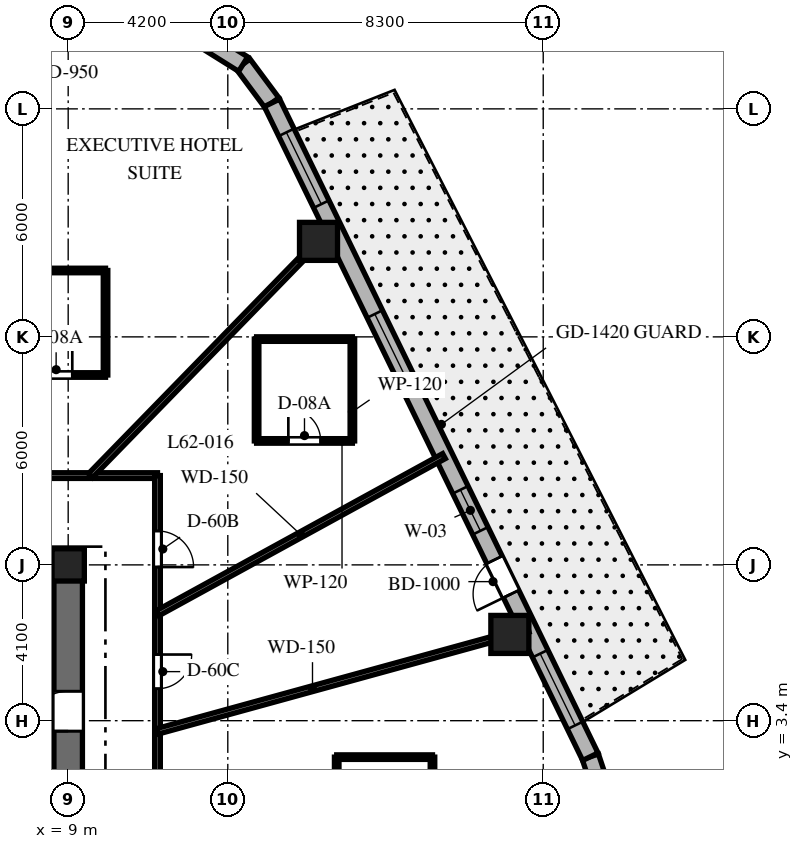
"""IFC4 building model, lengths in metres.
Left out: names, types, materials, properties, quantities, classifications, styles, units other than length and angle.
Written with IfcOpenShell. Run it as: python <this file> out.ifc"""

import sys

from ifc_helpers import new_model, si_unit, direction, frame, frame_2d, origin, origin_2d, place, context, subcontext, project, spatial, rectangle, extrude, element, fill, save


model = new_model("IFC4")
c1 = context("Model", 3, precision=1e-05, world=origin(), true_north=direction((0.0, 1.0)))
c2 = subcontext(c1, "Body", "Model", "MODEL_VIEW")
j1 = project(units=[si_unit("LENGTHUNIT", "METRE"), si_unit("PLANEANGLEUNIT", "RADIAN")], contexts=[c1])
p1 = place(None, origin())
s1 = spatial("IfcSite", under=j1, at=p1, CompositionType="ELEMENT")
p2 = place(p1, origin())
s2 = spatial("IfcBuilding", under=s1, at=p2, CompositionType="ELEMENT")
p3 = place(p2, frame((0.0, 0.0, 248.3)))
s3 = spatial("IfcBuildingStorey", under=s2, at=p3, CompositionType="ELEMENT", Elevation=248.3)
p4 = place(p3, frame((1.85, 7.5, 0.0), z_axis=(0.0, 0.0, 1.0), x_axis=(1.0, 0.0, 0.0)))
e1 = element("IfcWall", 1, at=p4, inside=s3, PredefinedType="SHEAR", context=c2, shape_type="SweptSolid", body=[
    extrude(rectangle(XDim=7.525, YDim=0.75, at=frame_2d((3.762, 0.0))), origin(), (0.0, 0.0, 1.0), 3.8),
])
p5 = place(p3, frame((9.0, -7.125, 0.0), z_axis=(0.0, 0.0, 1.0), x_axis=(0.0, 1.0, 0.0)))
e2 = element("IfcWall", 2, at=p5, inside=s3, PredefinedType="SHEAR", context=c2, shape_type="SweptSolid", body=[
    extrude(rectangle(XDim=14.25, YDim=0.75, at=frame_2d((7.125, 0.0))), origin(), (0.0, 0.0, 1.0), 3.8),
])
p6 = place(p5, frame((10.25, 0.0, 0.0)))
e3 = element("IfcOpeningElement", 3, at=p6, cuts=e2, PredefinedType="OPENING", context=c2, shape_type="SweptSolid", body=[
    extrude(rectangle(XDim=1.05, YDim=2.15, at=frame_2d((0.525, 1.075))), frame((0.0, 0.385, 0.0), z_axis=(0.0, -1.0, 0.0), x_axis=(1.0, 0.0, 0.0)), (0.0, 0.0, 1.0), 0.77),
])
p7 = place(p3, frame((9.0, 7.5, 0.0), z_axis=(0.0, 0.0, 1.0), x_axis=(1.0, 0.0, 0.0)))
e4 = element("IfcColumn", 4, at=p7, inside=s3, PredefinedType="COLUMN", context=c2, shape_type="SweptSolid", body=[
    extrude(rectangle(XDim=0.85, YDim=0.85, at=origin_2d()), origin(), (0.0, 0.0, 1.0), 3.8),
])
for number, where, z_axis, x_axis in (
    (5, (20.622, 5.67, 0.0), (0.0, 0.0, 1.0), (1.0, 0.0, 0.0)),
    (6, (15.587, 16.013, 0.0), (0.0, 0.0, 1.0), (1.0, 0.0, 0.0)),
):
    element("IfcColumn", number, at=place(p3, frame(where, z_axis=z_axis, x_axis=x_axis)), inside=s3, PredefinedType="COLUMN", context=c2, shape_type="SweptSolid", body=[
        extrude(rectangle(XDim=1.0, YDim=1.0, at=origin_2d()), origin(), (0.0, 0.0, 1.0), 3.8),
    ])
p8 = place(p3, frame((23.023, 1.604, 0.0), z_axis=(0.0, 0.0, 1.0), x_axis=(-0.316801227695, 0.948491951537, 0.0)))
e7 = element("IfcWall", 7, at=p8, inside=s3, PredefinedType="SOLIDWALL", context=c2, shape_type="SweptSolid", body=[
    extrude(rectangle(XDim=0.894, YDim=0.45, at=frame_2d((0.447, 0.0))), origin(), (0.0, 0.0, 1.0), 3.5),
])
p9 = place(p3, frame((14.362, 19.658, 0.0), z_axis=(0.0, 0.0, 1.0), x_axis=(-0.596642462792, 0.80250717853, 0.0)))
e8 = element("IfcWall", 8, at=p9, inside=s3, PredefinedType="SOLIDWALL", context=c2, shape_type="SweptSolid", body=[
    extrude(rectangle(XDim=1.27, YDim=0.45, at=frame_2d((0.635, 0.0))), origin(), (0.0, 0.0, 1.0), 3.5),
])
p10 = place(p3, frame((13.604, 20.678, 0.0), z_axis=(0.0, 0.0, 1.0), x_axis=(-0.847910404124, 0.53013955387, 0.0)))
e9 = element("IfcWall", 9, at=p10, inside=s3, PredefinedType="SOLIDWALL", context=c2, shape_type="SweptSolid", body=[
    extrude(rectangle(XDim=1.249, YDim=0.45, at=frame_2d((0.624, 0.0))), origin(), (0.0, 0.0, 1.0), 3.5),
])
p11 = place(p3, frame((22.74, 2.452, 0.0), z_axis=(0.0, 0.0, 1.0), x_axis=(-0.437753424814, 0.899095066755, 0.0)))
e10 = element("IfcWall", 10, at=p11, inside=s3, PredefinedType="SOLIDWALL", context=c2, shape_type="SweptSolid", body=[
    extrude(rectangle(XDim=19.137, YDim=0.45, at=frame_2d((9.569, 0.0))), origin(), (0.0, 0.0, 1.0), 3.5),
])
p12 = place(p11, frame((4.763, 0.0, 0.0)))
e11 = element("IfcOpeningElement", 11, at=p12, cuts=e10, PredefinedType="OPENING", context=c2, shape_type="SweptSolid", body=[
    extrude(rectangle(XDim=1.0, YDim=2.15, at=frame_2d((0.5, 1.075))), frame((0.0, 0.235, 0.0), z_axis=(0.0, -1.0, 0.0), x_axis=(1.0, 0.0, 0.0)), (0.0, 0.0, 1.0), 0.47),
])
p13 = place(p11, frame((6.611, 0.0, 0.8)))
e12 = element("IfcOpeningElement", 12, at=p13, cuts=e10, PredefinedType="OPENING", context=c2, shape_type="SweptSolid", body=[
    extrude(rectangle(XDim=1.2, YDim=1.8, at=frame_2d((0.6, 0.9))), frame((0.0, 0.235, 0.0), z_axis=(0.0, -1.0, 0.0), x_axis=(1.0, 0.0, 0.0)), (0.0, 0.0, 1.0), 0.47),
])
p14 = place(p11, frame((10.856, 0.0, 0.8)))
e13 = element("IfcOpeningElement", 13, at=p14, cuts=e10, PredefinedType="OPENING", context=c2, shape_type="SweptSolid", body=[
    extrude(rectangle(XDim=2.1, YDim=1.85, at=frame_2d((1.05, 0.925))), frame((0.0, 0.235, 0.0), z_axis=(0.0, -1.0, 0.0), x_axis=(1.0, 0.0, 0.0)), (0.0, 0.0, 1.0), 0.47),
])
p15 = place(p11, frame((16.173, 0.0, 0.8)))
e14 = element("IfcOpeningElement", 14, at=p15, cuts=e10, PredefinedType="OPENING", context=c2, shape_type="SweptSolid", body=[
    extrude(rectangle(XDim=2.1, YDim=1.85, at=frame_2d((1.05, 0.925))), frame((0.0, 0.235, 0.0), z_axis=(0.0, -1.0, 0.0), x_axis=(1.0, 0.0, 0.0)), (0.0, 0.0, 1.0), 0.47),
])
p16 = place(p11, frame((0.916, 0.0, 0.8)))
e15 = element("IfcOpeningElement", 15, at=p16, cuts=e10, PredefinedType="OPENING", context=c2, shape_type="SweptSolid", body=[
    extrude(rectangle(XDim=2.1, YDim=1.85, at=frame_2d((1.05, 0.925))), frame((0.0, 0.235, 0.0), z_axis=(0.0, -1.0, 0.0), x_axis=(1.0, 0.0, 0.0)), (0.0, 0.0, 1.0), 0.47),
])
p17 = place(p3, frame((0.92, 9.85, 0.0), z_axis=(0.0, 0.0, 1.0), x_axis=(1.0, 0.0, 0.0)))
e16 = element("IfcWall", 16, at=p17, inside=s3, PredefinedType="PARTITIONING", context=c2, shape_type="SweptSolid", body=[
    extrude(rectangle(XDim=10.43, YDim=0.15, at=frame_2d((5.215, 0.0))), origin(), (0.0, 0.0, 1.0), 2.99),
])
p18 = place(p17, frame((4.949, 0.0, 0.0)))
e17 = element("IfcOpeningElement", 17, at=p18, cuts=e16, PredefinedType="OPENING", context=c2, shape_type="SweptSolid", body=[
    extrude(rectangle(XDim=0.95, YDim=2.03, at=frame_2d((0.475, 1.015))), frame((0.0, 0.085, 0.0), z_axis=(0.0, -1.0, 0.0), x_axis=(1.0, 0.0, 0.0)), (0.0, 0.0, 1.0), 0.17),
])
p19 = place(p3, frame((11.35, 9.85, 0.0), z_axis=(0.0, 0.0, 1.0), x_axis=(0.0, -1.0, 0.0)))
e18 = element("IfcWall", 18, at=p19, inside=s3, PredefinedType="PARTITIONING", context=c2, shape_type="SweptSolid", body=[
    extrude(rectangle(XDim=12.4, YDim=0.15, at=frame_2d((6.2, 0.0))), origin(), (0.0, 0.0, 1.0), 2.99),
])
p20 = place(p19, frame((4.709, 0.0, 0.0)))
e19 = element("IfcOpeningElement", 19, at=p20, cuts=e18, PredefinedType="OPENING", context=c2, shape_type="SweptSolid", body=[
    extrude(rectangle(XDim=0.9, YDim=2.03, at=frame_2d((0.45, 1.015))), frame((0.0, 0.085, 0.0), z_axis=(0.0, -1.0, 0.0), x_axis=(1.0, 0.0, 0.0)), (0.0, 0.0, 1.0), 0.17),
])
p21 = place(p19, frame((1.457, 0.0, 0.0)))
e20 = element("IfcOpeningElement", 20, at=p21, cuts=e18, PredefinedType="OPENING", context=c2, shape_type="SweptSolid", body=[
    extrude(rectangle(XDim=0.95, YDim=2.03, at=frame_2d((0.475, 1.015))), frame((0.0, 0.085, 0.0), z_axis=(0.0, -1.0, 0.0), x_axis=(1.0, 0.0, 0.0)), (0.0, 0.0, 1.0), 0.17),
])
p22 = place(p19, frame((8.835, 0.0, 0.0)))
e21 = element("IfcOpeningElement", 21, at=p22, cuts=e18, PredefinedType="OPENING", context=c2, shape_type="SweptSolid", body=[
    extrude(rectangle(XDim=0.95, YDim=2.03, at=frame_2d((0.475, 1.015))), frame((0.0, 0.085, 0.0), z_axis=(0.0, -1.0, 0.0), x_axis=(1.0, 0.0, 0.0)), (0.0, 0.0, 1.0), 0.17),
])
p23 = place(p3, frame((11.35, 3.121, 0.0), z_axis=(0.0, 0.0, 1.0), x_axis=(0.964212793822, 0.265129568758, 0.0)))
e22 = element("IfcWall", 22, at=p23, inside=s3, PredefinedType="PARTITIONING", context=c2, shape_type="SweptSolid", body=[
    extrude(rectangle(XDim=10.12, YDim=0.15, at=frame_2d((5.06, 0.0))), origin(), (0.0, 0.0, 1.0), 2.74),
])
p24 = place(p3, frame((11.35, 6.227, 0.0), z_axis=(0.0, 0.0, 1.0), x_axis=(0.876723190824, 0.480995266786, 0.0)))
e23 = element("IfcWall", 23, at=p24, inside=s3, PredefinedType="PARTITIONING", context=c2, shape_type="SweptSolid", body=[
    extrude(rectangle(XDim=8.598, YDim=0.15, at=frame_2d((4.299, 0.0))), origin(), (0.0, 0.0, 1.0), 2.74),
])
p25 = place(p3, frame((9.588, 9.85, 0.0), z_axis=(0.0, 0.0, 1.0), x_axis=(0.697519469595, 0.716565830567, 0.0)))
e24 = element("IfcWall", 24, at=p25, inside=s3, PredefinedType="PARTITIONING", context=c2, shape_type="SweptSolid", body=[
    extrude(rectangle(XDim=9.126, YDim=0.15, at=frame_2d((4.563, 0.0))), origin(), (0.0, 0.0, 1.0), 2.74),
])
p26 = place(p3, frame((13.958, 10.762, 0.0), z_axis=(0.0, 0.0, 1.0), x_axis=(1.0, 0.0, 0.0)))
e25 = element("IfcWall", 25, at=p26, inside=s3, PredefinedType="PARTITIONING", context=c2, shape_type="SweptSolid", body=[
    extrude(rectangle(XDim=2.52, YDim=0.12, at=frame_2d((1.26, 0.0))), origin(), (0.0, 0.0, 1.0), 3.026),
])
p27 = place(p26, frame((0.835, 0.0, 0.0)))
e26 = element("IfcOpeningElement", 26, at=p27, cuts=e25, PredefinedType="OPENING", context=c2, shape_type="SweptSolid", body=[
    extrude(rectangle(XDim=0.85, YDim=2.03, at=frame_2d((0.425, 1.015))), frame((0.0, 0.07, 0.0), z_axis=(0.0, -1.0, 0.0), x_axis=(1.0, 0.0, 0.0)), (0.0, 0.0, 1.0), 0.14),
])
p28 = place(p3, frame((16.478, 10.762, 0.0), z_axis=(0.0, 0.0, 1.0), x_axis=(0.0, 1.0, 0.0)))
e27 = element("IfcWall", 27, at=p28, inside=s3, PredefinedType="PARTITIONING", context=c2, shape_type="SweptSolid", body=[
    extrude(rectangle(XDim=2.68, YDim=0.12, at=frame_2d((1.34, 0.0))), origin(), (0.0, 0.0, 1.0), 3.5),
])
p29 = place(p3, frame((16.478, 13.442, 0.0), z_axis=(0.0, 0.0, 1.0), x_axis=(-1.0, 0.0, 0.0)))
e28 = element("IfcWall", 28, at=p29, inside=s3, PredefinedType="PARTITIONING", context=c2, shape_type="SweptSolid", body=[
    extrude(rectangle(XDim=2.52, YDim=0.12, at=frame_2d((1.26, 0.0))), origin(), (0.0, 0.0, 1.0), 3.5),
])
p30 = place(p3, frame((13.958, 13.442, 0.0), z_axis=(0.0, 0.0, 1.0), x_axis=(0.0, -1.0, 0.0)))
e29 = element("IfcWall", 29, at=p30, inside=s3, PredefinedType="PARTITIONING", context=c2, shape_type="SweptSolid", body=[
    extrude(rectangle(XDim=2.68, YDim=0.12, at=frame_2d((1.34, 0.0))), origin(), (0.0, 0.0, 1.0), 3.026),
])
p31 = place(p3, frame((7.383, 12.497, 0.0), z_axis=(0.0, 0.0, 1.0), x_axis=(1.0, 0.0, 0.0)))
e30 = element("IfcWall", 30, at=p31, inside=s3, PredefinedType="PARTITIONING", context=c2, shape_type="SweptSolid", body=[
    extrude(rectangle(XDim=2.6, YDim=0.12, at=frame_2d((1.3, 0.0))), origin(), (0.0, 0.0, 1.0), 2.94),
])
p32 = place(p31, frame((0.875, 0.0, 0.0)))
e31 = element("IfcOpeningElement", 31, at=p32, cuts=e30, PredefinedType="OPENING", context=c2, shape_type="SweptSolid", body=[
    extrude(rectangle(XDim=0.85, YDim=2.03, at=frame_2d((0.425, 1.015))), frame((0.0, 0.07, 0.0), z_axis=(0.0, -1.0, 0.0), x_axis=(1.0, 0.0, 0.0)), (0.0, 0.0, 1.0), 0.14),
])
p33 = place(p3, frame((9.983, 12.497, 0.0), z_axis=(0.0, 0.0, 1.0), x_axis=(0.0, 1.0, 0.0)))
e32 = element("IfcWall", 32, at=p33, inside=s3, PredefinedType="PARTITIONING", context=c2, shape_type="SweptSolid", body=[
    extrude(rectangle(XDim=2.75, YDim=0.12, at=frame_2d((1.375, 0.0))), origin(), (0.0, 0.0, 1.0), 3.072),
])
p34 = place(p3, frame((9.983, 15.247, 0.0), z_axis=(0.0, 0.0, 1.0), x_axis=(-1.0, 0.0, 0.0)))
e33 = element("IfcWall", 33, at=p34, inside=s3, PredefinedType="PARTITIONING", context=c2, shape_type="SweptSolid", body=[
    extrude(rectangle(XDim=2.6, YDim=0.12, at=frame_2d((1.3, 0.0))), origin(), (0.0, 0.0, 1.0), 3.072),
])
p35 = place(p3, frame((18.586, -0.239, 0.0), z_axis=(0.0, 0.0, 1.0), x_axis=(0.0, 1.0, 0.0)))
e34 = element("IfcWall", 34, at=p35, inside=s3, PredefinedType="PARTITIONING", context=c2, shape_type="SweptSolid", body=[
    extrude(rectangle(XDim=2.68, YDim=0.12, at=frame_2d((1.34, 0.0))), origin(), (0.0, 0.0, 1.0), 3.5),
])
p36 = place(p3, frame((18.586, 2.441, 0.0), z_axis=(0.0, 0.0, 1.0), x_axis=(-1.0, 0.0, 0.0)))
e35 = element("IfcWall", 35, at=p36, inside=s3, PredefinedType="PARTITIONING", context=c2, shape_type="SweptSolid", body=[
    extrude(rectangle(XDim=2.52, YDim=0.12, at=frame_2d((1.26, 0.0))), origin(), (0.0, 0.0, 1.0), 2.94),
])
p37 = place(p3, frame((16.066, 2.441, 0.0), z_axis=(0.0, 0.0, 1.0), x_axis=(0.0, -1.0, 0.0)))
e36 = element("IfcWall", 36, at=p37, inside=s3, PredefinedType="PARTITIONING", context=c2, shape_type="SweptSolid", body=[
    extrude(rectangle(XDim=2.68, YDim=0.12, at=frame_2d((1.34, 0.0))), origin(), (0.0, 0.0, 1.0), 3.5),
])
p38 = place(p12, origin())
e37 = element("IfcDoor", 37, at=p38, inside=s3, OperationType="SINGLE_SWING_LEFT", PredefinedType="DOOR", context=c2, shape_type="SweptSolid", body=[
    extrude(rectangle(XDim=1.0, YDim=2.15, at=frame_2d((0.5, 1.075))), frame((0.0, 0.025, 0.0), z_axis=(0.0, -1.0, 0.0), x_axis=(1.0, 0.0, 0.0)), (0.0, 0.0, 1.0), 0.05),
])
fill(e11, e37)
p39 = place(p13, origin())
e38 = element("IfcWindow", 38, at=p39, inside=s3, PartitioningType="SINGLE_PANEL", PredefinedType="WINDOW", context=c2, shape_type="SweptSolid", body=[
    extrude(rectangle(XDim=1.2, YDim=1.8, at=frame_2d((0.6, 0.9))), frame((0.0, 0.03, 0.0), z_axis=(0.0, -1.0, 0.0), x_axis=(1.0, 0.0, 0.0)), (0.0, 0.0, 1.0), 0.06),
])
fill(e12, e38)
p40 = place(p14, origin())
e39 = element("IfcWindow", 39, at=p40, inside=s3, PartitioningType="SINGLE_PANEL", PredefinedType="WINDOW", context=c2, shape_type="SweptSolid", body=[
    extrude(rectangle(XDim=2.1, YDim=1.85, at=frame_2d((1.05, 0.925))), frame((0.0, 0.03, 0.0), z_axis=(0.0, -1.0, 0.0), x_axis=(1.0, 0.0, 0.0)), (0.0, 0.0, 1.0), 0.06),
])
fill(e13, e39)
p41 = place(p15, origin())
e40 = element("IfcWindow", 40, at=p41, inside=s3, PartitioningType="SINGLE_PANEL", PredefinedType="WINDOW", context=c2, shape_type="SweptSolid", body=[
    extrude(rectangle(XDim=2.1, YDim=1.85, at=frame_2d((1.05, 0.925))), frame((0.0, 0.03, 0.0), z_axis=(0.0, -1.0, 0.0), x_axis=(1.0, 0.0, 0.0)), (0.0, 0.0, 1.0), 0.06),
])
fill(e14, e40)
p42 = place(p16, origin())
e41 = element("IfcWindow", 41, at=p42, inside=s3, PartitioningType="SINGLE_PANEL", PredefinedType="WINDOW", context=c2, shape_type="SweptSolid", body=[
    extrude(rectangle(XDim=2.1, YDim=1.85, at=frame_2d((1.05, 0.925))), frame((0.0, 0.03, 0.0), z_axis=(0.0, -1.0, 0.0), x_axis=(1.0, 0.0, 0.0)), (0.0, 0.0, 1.0), 0.06),
])
fill(e15, e41)
p43 = place(p6, origin())
e42 = element("IfcDoor", 42, at=p43, inside=s3, OperationType="SINGLE_SWING_LEFT", PredefinedType="DOOR", context=c2, shape_type="SweptSolid", body=[
    extrude(rectangle(XDim=1.05, YDim=2.15, at=frame_2d((0.525, 1.075))), frame((0.0, 0.025, 0.0), z_axis=(0.0, -1.0, 0.0), x_axis=(1.0, 0.0, 0.0)), (0.0, 0.0, 1.0), 0.05),
])
fill(e3, e42)
p44 = place(p20, origin())
e43 = element("IfcDoor", 43, at=p44, inside=s3, OperationType="SINGLE_SWING_LEFT", PredefinedType="DOOR", context=c2, shape_type="SweptSolid", body=[
    extrude(rectangle(XDim=0.9, YDim=2.03, at=frame_2d((0.45, 1.015))), frame((0.0, 0.025, 0.0), z_axis=(0.0, -1.0, 0.0), x_axis=(1.0, 0.0, 0.0)), (0.0, 0.0, 1.0), 0.05),
])
fill(e19, e43)
p45 = place(p21, origin())
e44 = element("IfcDoor", 44, at=p45, inside=s3, OperationType="SINGLE_SWING_RIGHT", PredefinedType="DOOR", context=c2, shape_type="SweptSolid", body=[
    extrude(rectangle(XDim=0.95, YDim=2.03, at=frame_2d((0.475, 1.015))), frame((0.0, 0.025, 0.0), z_axis=(0.0, -1.0, 0.0), x_axis=(1.0, 0.0, 0.0)), (0.0, 0.0, 1.0), 0.05),
])
fill(e20, e44)
p46 = place(p27, origin())
e45 = element("IfcDoor", 45, at=p46, inside=s3, OperationType="SINGLE_SWING_LEFT", PredefinedType="DOOR", context=c2, shape_type="SweptSolid", body=[
    extrude(rectangle(XDim=0.85, YDim=2.03, at=frame_2d((0.425, 1.015))), frame((0.0, 0.025, 0.0), z_axis=(0.0, -1.0, 0.0), x_axis=(1.0, 0.0, 0.0)), (0.0, 0.0, 1.0), 0.05),
])
fill(e26, e45)
p47 = place(p32, origin())
e46 = element("IfcDoor", 46, at=p47, inside=s3, OperationType="SINGLE_SWING_RIGHT", PredefinedType="DOOR", context=c2, shape_type="SweptSolid", body=[
    extrude(rectangle(XDim=0.85, YDim=2.03, at=frame_2d((0.425, 1.015))), frame((0.0, 0.025, 0.0), z_axis=(0.0, -1.0, 0.0), x_axis=(1.0, 0.0, 0.0)), (0.0, 0.0, 1.0), 0.05),
])
fill(e31, e46)
save(model, sys.argv[1])
